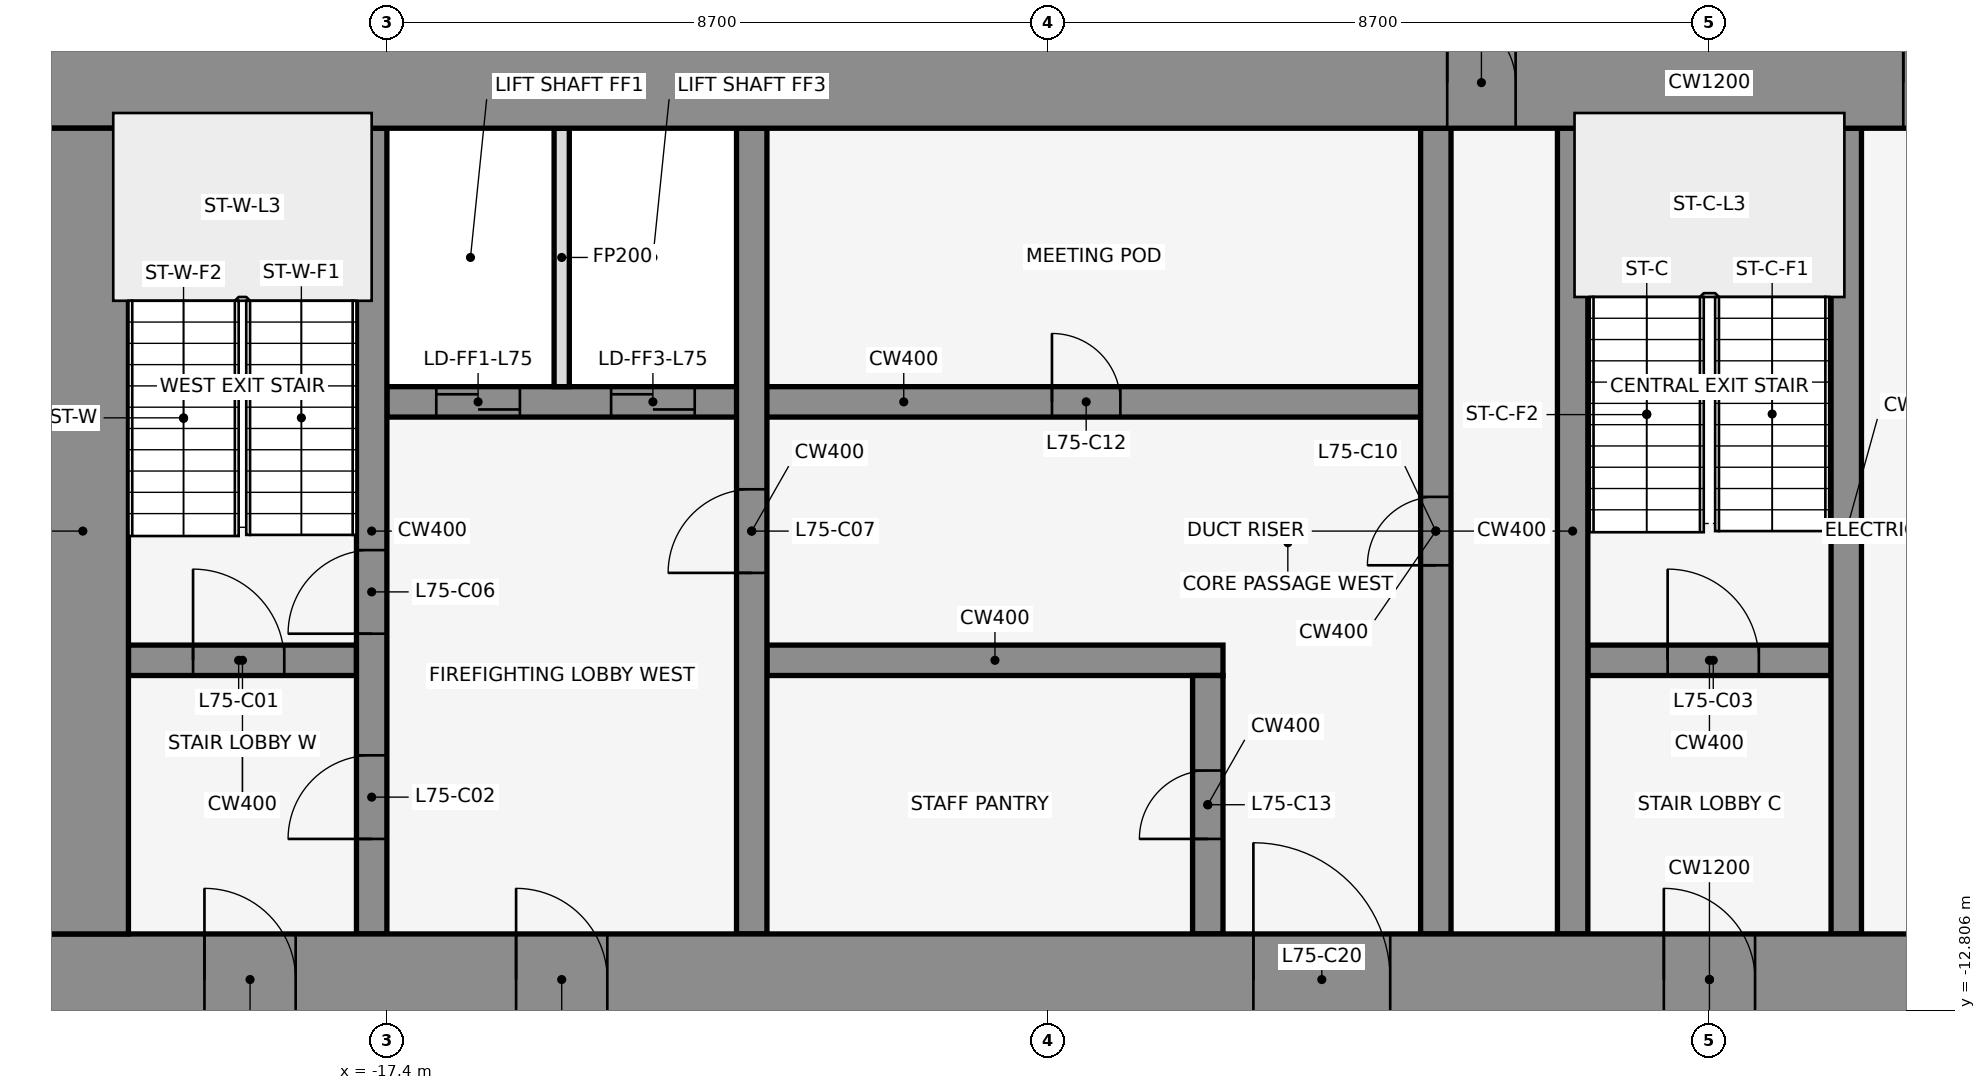
"""IFC4 building model, lengths in metres.
Left out: names, types, materials, properties, quantities, classifications, styles, units other than length and angle.
Written with IfcOpenShell. Run it as: python <this file> out.ifc"""

import sys

from ifc_helpers import new_model, si_unit, direction, frame, frame_2d, origin, place, context, subcontext, project, spatial, rectangle, extrude, element, fill, save


model = new_model("IFC4")
c1 = context("Model", 3, precision=1e-05, world=origin(), true_north=direction((0.0, 1.0)))
c2 = subcontext(c1, "Body", "Model", "MODEL_VIEW")
j1 = project(units=[si_unit("LENGTHUNIT", "METRE"), si_unit("PLANEANGLEUNIT", "RADIAN")], contexts=[c1])
p1 = place(None, origin())
s1 = spatial("IfcSite", under=j1, at=p1, CompositionType="ELEMENT")
p2 = place(p1, origin())
s2 = spatial("IfcBuilding", under=s1, at=p2, CompositionType="ELEMENT")
p3 = place(p2, frame((0.0, 0.0, 333.5)))
s3 = spatial("IfcBuildingStorey", under=s2, at=p3, CompositionType="ELEMENT", Elevation=333.5)
for number, where, z_axis, x_axis in (
    (1, (1.901, 1.08, 0.0), (0.0, 0.0, 1.0), (-0.84, -0.543, 0.0)),
    (2, (-0.068, -0.105, 0.0), (0.0, 0.0, 1.0), (-0.84, 0.543, 0.0)),
    (3, (-14.599, 1.08, 0.0), (0.0, 0.0, 1.0), (-0.84, -0.543, 0.0)),
):
    element("IfcWall", number, at=place(p3, frame(where, z_axis=z_axis, x_axis=x_axis)), inside=s3, PredefinedType="STANDARD", context=c2, shape_type="SweptSolid", body=[
        extrude(rectangle(XDim=2.183, YDim=0.25, at=frame_2d((1.091, 0.0))), origin(), (0.0, 0.0, 1.0), 4.35),
    ])
p4 = place(p3, frame((-20.8, -8.2, 0.0), z_axis=(0.0, 0.0, 1.0), x_axis=(1.0, 0.0, 0.0)))
e4 = element("IfcWall", 4, at=p4, inside=s3, PredefinedType="SHEAR", context=c2, shape_type="SweptSolid", body=[
    extrude(rectangle(XDim=3.0, YDim=0.4, at=frame_2d((1.5, 0.0))), origin(), (0.0, 0.0, 1.0), 4.5),
])
p5 = place(p4, frame((0.85, 0.0, 0.0)))
e5 = element("IfcOpeningElement", 5, at=p5, cuts=e4, PredefinedType="OPENING", context=c2, shape_type="SweptSolid", body=[
    extrude(rectangle(XDim=1.2, YDim=2.1, at=frame_2d((0.6, 1.05))), frame((0.0, 0.212, 0.0), z_axis=(0.0, -1.0, 0.0), x_axis=(1.0, 0.0, 0.0)), (0.0, 0.0, 1.0), 0.424),
])
p6 = place(p3, frame((-12.4, -8.2, 0.0), z_axis=(0.0, 0.0, 1.0), x_axis=(1.0, 0.0, 0.0)))
e6 = element("IfcWall", 6, at=p6, inside=s3, PredefinedType="SHEAR", context=c2, shape_type="SweptSolid", body=[
    extrude(rectangle(XDim=6.0, YDim=0.4, at=frame_2d((3.0, 0.0))), origin(), (0.0, 0.0, 1.0), 4.5),
])
p7 = place(p3, frame((-1.6, -8.2, 0.0), z_axis=(0.0, 0.0, 1.0), x_axis=(1.0, 0.0, 0.0)))
e7 = element("IfcWall", 7, at=p7, inside=s3, PredefinedType="SHEAR", context=c2, shape_type="SweptSolid", body=[
    extrude(rectangle(XDim=3.2, YDim=0.4, at=frame_2d((1.6, 0.0))), origin(), (0.0, 0.0, 1.0), 4.5),
])
p8 = place(p7, frame((1.05, 0.0, 0.0)))
e8 = element("IfcOpeningElement", 8, at=p8, cuts=e7, PredefinedType="OPENING", context=c2, shape_type="SweptSolid", body=[
    extrude(rectangle(XDim=1.2, YDim=2.1, at=frame_2d((0.6, 1.05))), frame((0.0, 0.212, 0.0), z_axis=(0.0, -1.0, 0.0), x_axis=(1.0, 0.0, 0.0)), (0.0, 0.0, 1.0), 0.424),
])
p9 = place(p3, frame((-17.4, -4.8, 0.0), z_axis=(0.0, 0.0, 1.0), x_axis=(1.0, 0.0, 0.0)))
e9 = element("IfcWall", 9, at=p9, inside=s3, PredefinedType="SHEAR", context=c2, shape_type="SweptSolid", body=[
    extrude(rectangle(XDim=13.6, YDim=0.4, at=frame_2d((6.8, 0.0))), origin(), (0.0, 0.0, 1.0), 4.5),
])
p10 = place(p9, frame((0.65, 0.0, 0.0)))
e10 = element("IfcOpeningElement", 10, at=p10, cuts=e9, PredefinedType="OPENING", context=c2, shape_type="SweptSolid", body=[
    extrude(rectangle(XDim=1.1, YDim=2.1, at=frame_2d((0.55, 1.05))), frame((0.0, 0.212, 0.0), z_axis=(0.0, -1.0, 0.0), x_axis=(1.0, 0.0, 0.0)), (0.0, 0.0, 1.0), 0.424),
])
p11 = place(p9, frame((2.95, 0.0, 0.0)))
e11 = element("IfcOpeningElement", 11, at=p11, cuts=e9, PredefinedType="OPENING", context=c2, shape_type="SweptSolid", body=[
    extrude(rectangle(XDim=1.1, YDim=2.1, at=frame_2d((0.55, 1.05))), frame((0.0, 0.212, 0.0), z_axis=(0.0, -1.0, 0.0), x_axis=(1.0, 0.0, 0.0)), (0.0, 0.0, 1.0), 0.424),
])
p12 = place(p9, frame((8.75, 0.0, 0.0)))
e12 = element("IfcOpeningElement", 12, at=p12, cuts=e9, PredefinedType="OPENING", context=c2, shape_type="SweptSolid", body=[
    extrude(rectangle(XDim=0.9, YDim=2.1, at=frame_2d((0.45, 1.05))), frame((0.0, 0.212, 0.0), z_axis=(0.0, -1.0, 0.0), x_axis=(1.0, 0.0, 0.0)), (0.0, 0.0, 1.0), 0.424),
])
p13 = place(p3, frame((-17.6, -11.8, 0.0), z_axis=(0.0, 0.0, 1.0), x_axis=(0.0, 1.0, 0.0)))
e13 = element("IfcWall", 13, at=p13, inside=s3, PredefinedType="SHEAR", context=c2, shape_type="SweptSolid", body=[
    extrude(rectangle(XDim=10.6, YDim=0.4, at=frame_2d((5.3, 0.0))), origin(), (0.0, 0.0, 1.0), 4.5),
])
p14 = place(p13, frame((1.25, 0.0, 0.0)))
e14 = element("IfcOpeningElement", 14, at=p14, cuts=e13, PredefinedType="OPENING", context=c2, shape_type="SweptSolid", body=[
    extrude(rectangle(XDim=1.1, YDim=2.1, at=frame_2d((0.55, 1.05))), frame((0.0, 0.212, 0.0), z_axis=(0.0, -1.0, 0.0), x_axis=(1.0, 0.0, 0.0)), (0.0, 0.0, 1.0), 0.424),
])
p15 = place(p13, frame((3.95, 0.0, 0.0)))
e15 = element("IfcOpeningElement", 15, at=p15, cuts=e13, PredefinedType="OPENING", context=c2, shape_type="SweptSolid", body=[
    extrude(rectangle(XDim=1.1, YDim=2.1, at=frame_2d((0.55, 1.05))), frame((0.0, 0.212, 0.0), z_axis=(0.0, -1.0, 0.0), x_axis=(1.0, 0.0, 0.0)), (0.0, 0.0, 1.0), 0.424),
])
p16 = place(p3, frame((-15.1, -4.6, 0.0), z_axis=(0.0, 0.0, 1.0), x_axis=(0.0, 1.0, 0.0)))
e16 = element("IfcWall", 16, at=p16, inside=s3, PredefinedType="PARTITIONING", context=c2, shape_type="SweptSolid", body=[
    extrude(rectangle(XDim=3.4, YDim=0.2, at=frame_2d((1.7, 0.0))), origin(), (0.0, 0.0, 1.0), 3.339),
])
p17 = place(p3, frame((-12.6, -11.8, 0.0), z_axis=(0.0, 0.0, 1.0), x_axis=(0.0, 1.0, 0.0)))
e17 = element("IfcWall", 17, at=p17, inside=s3, PredefinedType="SHEAR", context=c2, shape_type="SweptSolid", body=[
    extrude(rectangle(XDim=10.6, YDim=0.4, at=frame_2d((5.3, 0.0))), origin(), (0.0, 0.0, 1.0), 4.5),
])
p18 = place(p17, frame((4.75, 0.0, 0.0)))
e18 = element("IfcOpeningElement", 18, at=p18, cuts=e17, PredefinedType="OPENING", context=c2, shape_type="SweptSolid", body=[
    extrude(rectangle(XDim=1.1, YDim=2.1, at=frame_2d((0.55, 1.05))), frame((0.0, 0.212, 0.0), z_axis=(0.0, -1.0, 0.0), x_axis=(1.0, 0.0, 0.0)), (0.0, 0.0, 1.0), 0.424),
])
p19 = place(p3, frame((-6.6, -11.8, 0.0), z_axis=(0.0, 0.0, 1.0), x_axis=(0.0, 1.0, 0.0)))
e19 = element("IfcWall", 19, at=p19, inside=s3, PredefinedType="SHEAR", context=c2, shape_type="SweptSolid", body=[
    extrude(rectangle(XDim=3.4, YDim=0.4, at=frame_2d((1.7, 0.0))), origin(), (0.0, 0.0, 1.0), 4.5),
])
p20 = place(p19, frame((1.25, 0.0, 0.0)))
e20 = element("IfcOpeningElement", 20, at=p20, cuts=e19, PredefinedType="OPENING", context=c2, shape_type="SweptSolid", body=[
    extrude(rectangle(XDim=0.9, YDim=2.1, at=frame_2d((0.45, 1.05))), frame((0.0, 0.212, 0.0), z_axis=(0.0, -1.0, 0.0), x_axis=(1.0, 0.0, 0.0)), (0.0, 0.0, 1.0), 0.424),
])
p21 = place(p3, frame((-3.6, -11.8, 0.0), z_axis=(0.0, 0.0, 1.0), x_axis=(0.0, 1.0, 0.0)))
e21 = element("IfcWall", 21, at=p21, inside=s3, PredefinedType="SHEAR", context=c2, shape_type="SweptSolid", body=[
    extrude(rectangle(XDim=10.6, YDim=0.4, at=frame_2d((5.3, 0.0))), origin(), (0.0, 0.0, 1.0), 4.5),
])
p22 = place(p21, frame((4.85, 0.0, 0.0)))
e22 = element("IfcOpeningElement", 22, at=p22, cuts=e21, PredefinedType="OPENING", context=c2, shape_type="SweptSolid", body=[
    extrude(rectangle(XDim=0.9, YDim=2.1, at=frame_2d((0.45, 1.05))), frame((0.0, 0.212, 0.0), z_axis=(0.0, -1.0, 0.0), x_axis=(1.0, 0.0, 0.0)), (0.0, 0.0, 1.0), 0.424),
])
for number, where, z_axis, x_axis in (
    (23, (-1.8, -11.8, 0.0), (0.0, 0.0, 1.0), (0.0, 1.0, 0.0)),
    (24, (1.8, -11.8, 0.0), (0.0, 0.0, 1.0), (0.0, 1.0, 0.0)),
):
    element("IfcWall", number, at=place(p3, frame(where, z_axis=z_axis, x_axis=x_axis)), inside=s3, PredefinedType="SHEAR", context=c2, shape_type="SweptSolid", body=[
        extrude(rectangle(XDim=10.6, YDim=0.4, at=frame_2d((5.3, 0.0))), origin(), (0.0, 0.0, 1.0), 4.5),
    ])
p23 = place(p3, frame((-22.0, -0.6, 0.0), z_axis=(0.0, 0.0, 1.0), x_axis=(1.0, 0.0, 0.0)))
e25 = element("IfcWall", 25, at=p23, inside=s3, PredefinedType="SHEAR", context=c2, shape_type="SweptSolid", body=[
    extrude(rectangle(XDim=44.0, YDim=1.2, at=frame_2d((22.0, 0.0))), origin(), (0.0, 0.0, 1.0), 4.5),
])
p24 = place(p23, frame((18.55, 0.0, 0.0)))
e26 = element("IfcOpeningElement", 26, at=p24, cuts=e25, PredefinedType="OPENING", context=c2, shape_type="SweptSolid", body=[
    extrude(rectangle(XDim=0.9, YDim=2.1, at=frame_2d((0.45, 1.05))), frame((0.0, 0.612, 0.0), z_axis=(0.0, -1.0, 0.0), x_axis=(1.0, 0.0, 0.0)), (0.0, 0.0, 1.0), 1.224),
])
p25 = place(p23, frame((24.55, 0.0, 0.0)))
e27 = element("IfcOpeningElement", 27, at=p25, cuts=e25, PredefinedType="OPENING", context=c2, shape_type="SweptSolid", body=[
    extrude(rectangle(XDim=0.9, YDim=2.1, at=frame_2d((0.45, 1.05))), frame((0.0, 0.612, 0.0), z_axis=(0.0, -1.0, 0.0), x_axis=(1.0, 0.0, 0.0)), (0.0, 0.0, 1.0), 1.224),
])
p26 = place(p3, frame((-22.0, -12.4, 0.0), z_axis=(0.0, 0.0, 1.0), x_axis=(1.0, 0.0, 0.0)))
e28 = element("IfcWall", 28, at=p26, inside=s3, PredefinedType="SHEAR", context=c2, shape_type="SweptSolid", body=[
    extrude(rectangle(XDim=44.0, YDim=1.2, at=frame_2d((22.0, 0.0))), origin(), (0.0, 0.0, 1.0), 4.5),
])
p27 = place(p26, frame((2.2, 0.0, 0.0)))
e29 = element("IfcOpeningElement", 29, at=p27, cuts=e28, PredefinedType="OPENING", context=c2, shape_type="SweptSolid", body=[
    extrude(rectangle(XDim=1.2, YDim=2.1, at=frame_2d((0.6, 1.05))), frame((0.0, 0.612, 0.0), z_axis=(0.0, -1.0, 0.0), x_axis=(1.0, 0.0, 0.0)), (0.0, 0.0, 1.0), 1.224),
])
p28 = place(p26, frame((21.4, 0.0, 0.0)))
e30 = element("IfcOpeningElement", 30, at=p28, cuts=e28, PredefinedType="OPENING", context=c2, shape_type="SweptSolid", body=[
    extrude(rectangle(XDim=1.2, YDim=2.1, at=frame_2d((0.6, 1.05))), frame((0.0, 0.612, 0.0), z_axis=(0.0, -1.0, 0.0), x_axis=(1.0, 0.0, 0.0)), (0.0, 0.0, 1.0), 1.224),
])
p29 = place(p26, frame((40.6, 0.0, 0.0)))
e31 = element("IfcOpeningElement", 31, at=p29, cuts=e28, PredefinedType="OPENING", context=c2, shape_type="SweptSolid", body=[
    extrude(rectangle(XDim=1.2, YDim=2.1, at=frame_2d((0.6, 1.05))), frame((0.0, 0.612, 0.0), z_axis=(0.0, -1.0, 0.0), x_axis=(1.0, 0.0, 0.0)), (0.0, 0.0, 1.0), 1.224),
])
p30 = place(p26, frame((16.0, 0.0, 0.0)))
e32 = element("IfcOpeningElement", 32, at=p30, cuts=e28, PredefinedType="OPENING", context=c2, shape_type="SweptSolid", body=[
    extrude(rectangle(XDim=1.8, YDim=2.1, at=frame_2d((0.9, 1.05))), frame((0.0, 0.612, 0.0), z_axis=(0.0, -1.0, 0.0), x_axis=(1.0, 0.0, 0.0)), (0.0, 0.0, 1.0), 1.224),
])
p31 = place(p26, frame((6.3, 0.0, 0.0)))
e33 = element("IfcOpeningElement", 33, at=p31, cuts=e28, PredefinedType="OPENING", context=c2, shape_type="SweptSolid", body=[
    extrude(rectangle(XDim=1.2, YDim=2.1, at=frame_2d((0.6, 1.05))), frame((0.0, 0.612, 0.0), z_axis=(0.0, -1.0, 0.0), x_axis=(1.0, 0.0, 0.0)), (0.0, 0.0, 1.0), 1.224),
])
p32 = place(p26, frame((26.2, 0.0, 0.0)))
e34 = element("IfcOpeningElement", 34, at=p32, cuts=e28, PredefinedType="OPENING", context=c2, shape_type="SweptSolid", body=[
    extrude(rectangle(XDim=1.8, YDim=2.1, at=frame_2d((0.9, 1.05))), frame((0.0, 0.612, 0.0), z_axis=(0.0, -1.0, 0.0), x_axis=(1.0, 0.0, 0.0)), (0.0, 0.0, 1.0), 1.224),
])
p33 = place(p26, frame((36.5, 0.0, 0.0)))
e35 = element("IfcOpeningElement", 35, at=p33, cuts=e28, PredefinedType="OPENING", context=c2, shape_type="SweptSolid", body=[
    extrude(rectangle(XDim=1.2, YDim=2.1, at=frame_2d((0.6, 1.05))), frame((0.0, 0.612, 0.0), z_axis=(0.0, -1.0, 0.0), x_axis=(1.0, 0.0, 0.0)), (0.0, 0.0, 1.0), 1.224),
])
p34 = place(p3, frame((-21.4, -11.8, 0.0), z_axis=(0.0, 0.0, 1.0), x_axis=(0.0, 1.0, 0.0)))
e36 = element("IfcWall", 36, at=p34, inside=s3, PredefinedType="SHEAR", context=c2, shape_type="SweptSolid", body=[
    extrude(rectangle(XDim=10.6, YDim=1.2, at=frame_2d((5.3, 0.0))), origin(), (0.0, 0.0, 1.0), 4.5),
])
p35 = place(p5, origin())
e37 = element("IfcDoor", 37, at=p35, inside=s3, OperationType="SINGLE_SWING_LEFT", PredefinedType="DOOR", context=c2, shape_type="SweptSolid", body=[
    extrude(rectangle(XDim=1.2, YDim=2.1, at=frame_2d((0.6, 1.05))), frame((0.0, 0.025, 0.0), z_axis=(0.0, -1.0, 0.0), x_axis=(1.0, 0.0, 0.0)), (0.0, 0.0, 1.0), 0.05),
])
fill(e5, e37)
p36 = place(p14, frame((1.1, 0.0, 0.0), z_axis=(0.0, 0.0, 1.0), x_axis=(-1.0, 0.0, 0.0)))
e38 = element("IfcDoor", 38, at=p36, inside=s3, OperationType="SINGLE_SWING_LEFT", PredefinedType="DOOR", context=c2, shape_type="SweptSolid", body=[
    extrude(rectangle(XDim=1.1, YDim=2.1, at=frame_2d((0.55, 1.05))), frame((0.0, 0.025, 0.0), z_axis=(0.0, -1.0, 0.0), x_axis=(1.0, 0.0, 0.0)), (0.0, 0.0, 1.0), 0.05),
])
fill(e14, e38)
p37 = place(p8, origin())
e39 = element("IfcDoor", 39, at=p37, inside=s3, OperationType="SINGLE_SWING_LEFT", PredefinedType="DOOR", context=c2, shape_type="SweptSolid", body=[
    extrude(rectangle(XDim=1.2, YDim=2.1, at=frame_2d((0.6, 1.05))), frame((0.0, 0.025, 0.0), z_axis=(0.0, -1.0, 0.0), x_axis=(1.0, 0.0, 0.0)), (0.0, 0.0, 1.0), 0.05),
])
fill(e8, e39)
p38 = place(p10, origin())
e40 = element("IfcDoor", 40, at=p38, inside=s3, OperationType="DOUBLE_DOOR_SLIDING", PredefinedType="DOOR", context=c2, shape_type="SweptSolid", body=[
    extrude(rectangle(XDim=1.1, YDim=2.1, at=frame_2d((0.55, 1.05))), frame((0.0, 0.025, 0.0), z_axis=(0.0, -1.0, 0.0), x_axis=(1.0, 0.0, 0.0)), (0.0, 0.0, 1.0), 0.05),
])
fill(e10, e40)
p39 = place(p11, origin())
e41 = element("IfcDoor", 41, at=p39, inside=s3, OperationType="DOUBLE_DOOR_SLIDING", PredefinedType="DOOR", context=c2, shape_type="SweptSolid", body=[
    extrude(rectangle(XDim=1.1, YDim=2.1, at=frame_2d((0.55, 1.05))), frame((0.0, 0.025, 0.0), z_axis=(0.0, -1.0, 0.0), x_axis=(1.0, 0.0, 0.0)), (0.0, 0.0, 1.0), 0.05),
])
fill(e11, e41)
p40 = place(p15, frame((1.1, 0.0, 0.0), z_axis=(0.0, 0.0, 1.0), x_axis=(-1.0, 0.0, 0.0)))
e42 = element("IfcDoor", 42, at=p40, inside=s3, OperationType="SINGLE_SWING_LEFT", PredefinedType="DOOR", context=c2, shape_type="SweptSolid", body=[
    extrude(rectangle(XDim=1.1, YDim=2.1, at=frame_2d((0.55, 1.05))), frame((0.0, 0.025, 0.0), z_axis=(0.0, -1.0, 0.0), x_axis=(1.0, 0.0, 0.0)), (0.0, 0.0, 1.0), 0.05),
])
fill(e15, e42)
p41 = place(p18, origin())
e43 = element("IfcDoor", 43, at=p41, inside=s3, OperationType="SINGLE_SWING_LEFT", PredefinedType="DOOR", context=c2, shape_type="SweptSolid", body=[
    extrude(rectangle(XDim=1.1, YDim=2.1, at=frame_2d((0.55, 1.05))), frame((0.0, 0.025, 0.0), z_axis=(0.0, -1.0, 0.0), x_axis=(1.0, 0.0, 0.0)), (0.0, 0.0, 1.0), 0.05),
])
fill(e18, e43)
p42 = place(p22, frame((0.9, 0.0, 0.0), z_axis=(0.0, 0.0, 1.0), x_axis=(-1.0, 0.0, 0.0)))
e44 = element("IfcDoor", 44, at=p42, inside=s3, OperationType="SINGLE_SWING_LEFT", PredefinedType="DOOR", context=c2, shape_type="SweptSolid", body=[
    extrude(rectangle(XDim=0.9, YDim=2.1, at=frame_2d((0.45, 1.05))), frame((0.0, 0.025, 0.0), z_axis=(0.0, -1.0, 0.0), x_axis=(1.0, 0.0, 0.0)), (0.0, 0.0, 1.0), 0.05),
])
fill(e22, e44)
p43 = place(p12, origin())
e45 = element("IfcDoor", 45, at=p43, inside=s3, OperationType="SINGLE_SWING_RIGHT", PredefinedType="DOOR", context=c2, shape_type="SweptSolid", body=[
    extrude(rectangle(XDim=0.9, YDim=2.1, at=frame_2d((0.45, 1.05))), frame((0.0, 0.025, 0.0), z_axis=(0.0, -1.0, 0.0), x_axis=(1.0, 0.0, 0.0)), (0.0, 0.0, 1.0), 0.05),
])
fill(e12, e45)
p44 = place(p20, origin())
e46 = element("IfcDoor", 46, at=p44, inside=s3, OperationType="SINGLE_SWING_LEFT", PredefinedType="DOOR", context=c2, shape_type="SweptSolid", body=[
    extrude(rectangle(XDim=0.9, YDim=2.1, at=frame_2d((0.45, 1.05))), frame((0.0, 0.025, 0.0), z_axis=(0.0, -1.0, 0.0), x_axis=(1.0, 0.0, 0.0)), (0.0, 0.0, 1.0), 0.05),
])
fill(e20, e46)
p45 = place(p24, origin())
e47 = element("IfcDoor", 47, at=p45, inside=s3, OperationType="SINGLE_SWING_LEFT", PredefinedType="DOOR", context=c2, shape_type="SweptSolid", body=[
    extrude(rectangle(XDim=0.9, YDim=2.1, at=frame_2d((0.45, 1.05))), frame((0.0, 0.025, 0.0), z_axis=(0.0, -1.0, 0.0), x_axis=(1.0, 0.0, 0.0)), (0.0, 0.0, 1.0), 0.05),
])
fill(e26, e47)
p46 = place(p25, origin())
e48 = element("IfcDoor", 48, at=p46, inside=s3, OperationType="SINGLE_SWING_LEFT", PredefinedType="DOOR", context=c2, shape_type="SweptSolid", body=[
    extrude(rectangle(XDim=0.9, YDim=2.1, at=frame_2d((0.45, 1.05))), frame((0.0, 0.025, 0.0), z_axis=(0.0, -1.0, 0.0), x_axis=(1.0, 0.0, 0.0)), (0.0, 0.0, 1.0), 0.05),
])
fill(e27, e48)
p47 = place(p27, frame((1.2, 0.0, 0.0), z_axis=(0.0, 0.0, 1.0), x_axis=(-1.0, 0.0, 0.0)))
e49 = element("IfcDoor", 49, at=p47, inside=s3, OperationType="SINGLE_SWING_RIGHT", PredefinedType="DOOR", context=c2, shape_type="SweptSolid", body=[
    extrude(rectangle(XDim=1.2, YDim=2.1, at=frame_2d((0.6, 1.05))), frame((0.0, 0.025, 0.0), z_axis=(0.0, -1.0, 0.0), x_axis=(1.0, 0.0, 0.0)), (0.0, 0.0, 1.0), 0.05),
])
fill(e29, e49)
p48 = place(p28, frame((1.2, 0.0, 0.0), z_axis=(0.0, 0.0, 1.0), x_axis=(-1.0, 0.0, 0.0)))
e50 = element("IfcDoor", 50, at=p48, inside=s3, OperationType="SINGLE_SWING_RIGHT", PredefinedType="DOOR", context=c2, shape_type="SweptSolid", body=[
    extrude(rectangle(XDim=1.2, YDim=2.1, at=frame_2d((0.6, 1.05))), frame((0.0, 0.025, 0.0), z_axis=(0.0, -1.0, 0.0), x_axis=(1.0, 0.0, 0.0)), (0.0, 0.0, 1.0), 0.05),
])
fill(e30, e50)
p49 = place(p30, origin())
e51 = element("IfcDoor", 51, at=p49, inside=s3, OperationType="SINGLE_SWING_LEFT", PredefinedType="DOOR", context=c2, shape_type="SweptSolid", body=[
    extrude(rectangle(XDim=1.8, YDim=2.1, at=frame_2d((0.9, 1.05))), frame((0.0, 0.025, 0.0), z_axis=(0.0, -1.0, 0.0), x_axis=(1.0, 0.0, 0.0)), (0.0, 0.0, 1.0), 0.05),
])
fill(e32, e51)
p50 = place(p31, frame((1.2, 0.0, 0.0), z_axis=(0.0, 0.0, 1.0), x_axis=(-1.0, 0.0, 0.0)))
e52 = element("IfcDoor", 52, at=p50, inside=s3, OperationType="SINGLE_SWING_RIGHT", PredefinedType="DOOR", context=c2, shape_type="SweptSolid", body=[
    extrude(rectangle(XDim=1.2, YDim=2.1, at=frame_2d((0.6, 1.05))), frame((0.0, 0.025, 0.0), z_axis=(0.0, -1.0, 0.0), x_axis=(1.0, 0.0, 0.0)), (0.0, 0.0, 1.0), 0.05),
])
fill(e33, e52)
save(model, sys.argv[1])
